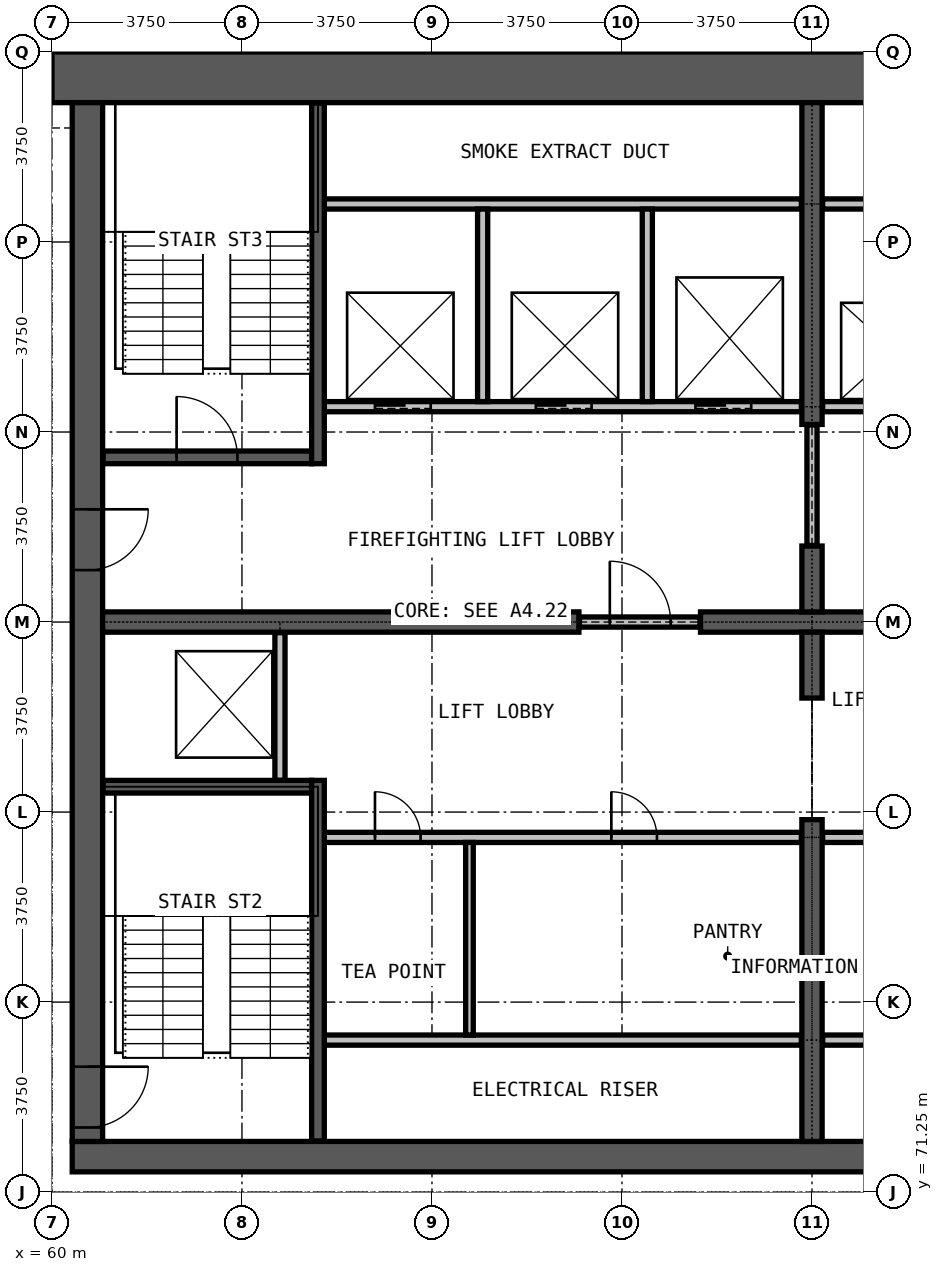
"""IFC4 building model, lengths in metres.
Left out: names, types, materials, properties, quantities, classifications, styles, units other than length and angle.
Written with IfcOpenShell. Run it as: python <this file> out.ifc"""

import sys

from ifc_helpers import new_model, si_unit, direction, frame, frame_2d, origin, place, context, subcontext, project, spatial, rectangle, extrude, element, fill, save


model = new_model("IFC4")
c1 = context("Model", 3, precision=1e-05, world=origin(), true_north=direction((0.0, 1.0)))
c2 = subcontext(c1, "Body", "Model", "MODEL_VIEW")
j1 = project(units=[si_unit("LENGTHUNIT", "METRE"), si_unit("PLANEANGLEUNIT", "RADIAN")], contexts=[c1])
p1 = place(None, origin())
s1 = spatial("IfcSite", under=j1, at=p1, CompositionType="ELEMENT")
p2 = place(p1, origin())
s2 = spatial("IfcBuilding", under=s1, at=p2, CompositionType="ELEMENT")
p3 = place(p2, frame((0.0, 0.0, 221.1)))
s3 = spatial("IfcBuildingStorey", under=s2, at=p3, CompositionType="ELEMENT", Elevation=221.1)
p4 = place(p3, frame((60.4, 71.95, 0.0), z_axis=(0.0, 0.0, 1.0), x_axis=(1.0, 0.0, 0.0)))
e1 = element("IfcWall", 1, at=p4, inside=s3, PredefinedType="SHEAR", context=c2, shape_type="SweptSolid", body=[
    extrude(rectangle(XDim=29.2, YDim=0.6, at=frame_2d((14.6, 0.0))), origin(), (0.0, 0.0, 1.0), 3.6),
])
p5 = place(p3, frame((90.0, 93.25, 0.0), z_axis=(0.0, 0.0, 1.0), x_axis=(-1.0, 0.0, 0.0)))
e2 = element("IfcWall", 2, at=p5, inside=s3, PredefinedType="SHEAR", context=c2, shape_type="SweptSolid", body=[
    extrude(rectangle(XDim=30.0, YDim=1.0, at=frame_2d((15.0, 0.0))), origin(), (0.0, 0.0, 1.0), 3.6),
])
p6 = place(p3, frame((60.7, 92.75, 0.0), z_axis=(0.0, 0.0, 1.0), x_axis=(0.0, -1.0, 0.0)))
e3 = element("IfcWall", 3, at=p6, inside=s3, PredefinedType="SHEAR", context=c2, shape_type="SweptSolid", body=[
    extrude(rectangle(XDim=20.5, YDim=0.6, at=frame_2d((10.25, 0.0))), origin(), (0.0, 0.0, 1.0), 3.6),
])
p7 = place(p6, frame((19.025, 0.0, 0.0)))
e4 = element("IfcOpeningElement", 4, at=p7, cuts=e3, PredefinedType="OPENING", context=c2, shape_type="SweptSolid", body=[
    extrude(rectangle(XDim=1.2, YDim=2.2, at=frame_2d((0.6, 1.1))), frame((0.0, 0.31, 0.0), z_axis=(0.0, -1.0, 0.0), x_axis=(1.0, 0.0, 0.0)), (0.0, 0.0, 1.0), 0.62),
])
p8 = place(p6, frame((8.025, 0.0, 0.0)))
e5 = element("IfcOpeningElement", 5, at=p8, cuts=e3, PredefinedType="OPENING", context=c2, shape_type="SweptSolid", body=[
    extrude(rectangle(XDim=1.2, YDim=2.2, at=frame_2d((0.6, 1.1))), frame((0.0, 0.31, 0.0), z_axis=(0.0, -1.0, 0.0), x_axis=(1.0, 0.0, 0.0)), (0.0, 0.0, 1.0), 0.62),
])
p9 = place(p3, frame((61.0, 82.5, 0.0), z_axis=(0.0, 0.0, 1.0), x_axis=(1.0, 0.0, 0.0)))
e6 = element("IfcWall", 6, at=p9, inside=s3, PredefinedType="SHEAR", context=c2, shape_type="SweptSolid", body=[
    extrude(rectangle(XDim=9.4, YDim=0.4, at=frame_2d((4.7, 0.0))), origin(), (0.0, 0.0, 1.0), 3.6),
])
p10 = place(p3, frame((72.8, 82.5, 0.0), z_axis=(0.0, 0.0, 1.0), x_axis=(1.0, 0.0, 0.0)))
e7 = element("IfcWall", 7, at=p10, inside=s3, PredefinedType="SHEAR", context=c2, shape_type="SweptSolid", body=[
    extrude(rectangle(XDim=4.4, YDim=0.4, at=frame_2d((2.2, 0.0))), origin(), (0.0, 0.0, 1.0), 3.6),
])
p11 = place(p3, frame((75.0, 72.25, 0.0), z_axis=(0.0, 0.0, 1.0), x_axis=(0.0, 1.0, 0.0)))
e8 = element("IfcWall", 8, at=p11, inside=s3, PredefinedType="SHEAR", context=c2, shape_type="SweptSolid", body=[
    extrude(rectangle(XDim=6.35, YDim=0.4, at=frame_2d((3.175, 0.0))), origin(), (0.0, 0.0, 1.0), 3.6),
])
for number, where, z_axis, x_axis in (
    (9, (75.0, 81.0, 0.0), (0.0, 0.0, 1.0), (0.0, 1.0, 0.0)),
    (10, (75.0, 82.7, 0.0), (0.0, 0.0, 1.0), (0.0, 1.0, 0.0)),
):
    element("IfcWall", number, at=place(p3, frame(where, z_axis=z_axis, x_axis=x_axis)), inside=s3, PredefinedType="SHEAR", context=c2, shape_type="SweptSolid", body=[
        extrude(rectangle(XDim=1.3, YDim=0.4, at=frame_2d((0.65, 0.0))), origin(), (0.0, 0.0, 1.0), 3.6),
    ])
p12 = place(p3, frame((75.0, 86.4, 0.0), z_axis=(0.0, 0.0, 1.0), x_axis=(0.0, 1.0, 0.0)))
e11 = element("IfcWall", 11, at=p12, inside=s3, PredefinedType="SHEAR", context=c2, shape_type="SweptSolid", body=[
    extrude(rectangle(XDim=6.35, YDim=0.4, at=frame_2d((3.175, 0.0))), origin(), (0.0, 0.0, 1.0), 3.6),
])
for number, where, z_axis, x_axis in (
    (12, (65.375, 74.25, 0.0), (0.0, 0.0, 1.0), (1.0, 0.0, 0.0)),
    (13, (75.21, 74.25, 0.0), (0.0, 0.0, 1.0), (1.0, 0.0, 0.0)),
):
    element("IfcWall", number, at=place(p3, frame(where, z_axis=z_axis, x_axis=x_axis)), inside=s3, PredefinedType="PARTITIONING", context=c2, shape_type="SweptSolid", body=[
        extrude(rectangle(XDim=9.415, YDim=0.2, at=frame_2d((4.708, 0.0))), origin(), (0.0, 0.0, 1.0), 3.3),
    ])
p13 = place(p3, frame((65.375, 78.25, 0.0), z_axis=(0.0, 0.0, 1.0), x_axis=(1.0, 0.0, 0.0)))
e14 = element("IfcWall", 14, at=p13, inside=s3, PredefinedType="PARTITIONING", context=c2, shape_type="SweptSolid", body=[
    extrude(rectangle(XDim=9.415, YDim=0.2, at=frame_2d((4.708, 0.0))), origin(), (0.0, 0.0, 1.0), 3.3),
])
p14 = place(p13, frame((1.0, 0.0, 0.0)))
e15 = element("IfcOpeningElement", 15, at=p14, cuts=e14, PredefinedType="OPENING", context=c2, shape_type="SweptSolid", body=[
    extrude(rectangle(XDim=0.9, YDim=2.2, at=frame_2d((0.45, 1.1))), frame((0.0, 0.11, 0.0), z_axis=(0.0, -1.0, 0.0), x_axis=(1.0, 0.0, 0.0)), (0.0, 0.0, 1.0), 0.22),
])
p15 = place(p13, frame((5.665, 0.0, 0.0)))
e16 = element("IfcOpeningElement", 16, at=p15, cuts=e14, PredefinedType="OPENING", context=c2, shape_type="SweptSolid", body=[
    extrude(rectangle(XDim=0.9, YDim=2.2, at=frame_2d((0.45, 1.1))), frame((0.0, 0.11, 0.0), z_axis=(0.0, -1.0, 0.0), x_axis=(1.0, 0.0, 0.0)), (0.0, 0.0, 1.0), 0.22),
])
p16 = place(p3, frame((75.21, 78.25, 0.0), z_axis=(0.0, 0.0, 1.0), x_axis=(1.0, 0.0, 0.0)))
e17 = element("IfcWall", 17, at=p16, inside=s3, PredefinedType="PARTITIONING", context=c2, shape_type="SweptSolid", body=[
    extrude(rectangle(XDim=9.415, YDim=0.2, at=frame_2d((4.708, 0.0))), origin(), (0.0, 0.0, 1.0), 3.3),
])
p17 = place(p16, frame((1.9, 0.0, 0.0)))
e18 = element("IfcOpeningElement", 18, at=p17, cuts=e17, PredefinedType="OPENING", context=c2, shape_type="SweptSolid", body=[
    extrude(rectangle(XDim=0.9, YDim=2.2, at=frame_2d((0.45, 1.1))), frame((0.0, 0.11, 0.0), z_axis=(0.0, -1.0, 0.0), x_axis=(1.0, 0.0, 0.0)), (0.0, 0.0, 1.0), 0.22),
])
p18 = place(p16, frame((6.565, 0.0, 0.0)))
e19 = element("IfcOpeningElement", 19, at=p18, cuts=e17, PredefinedType="OPENING", context=c2, shape_type="SweptSolid", body=[
    extrude(rectangle(XDim=0.9, YDim=2.2, at=frame_2d((0.45, 1.1))), frame((0.0, 0.11, 0.0), z_axis=(0.0, -1.0, 0.0), x_axis=(1.0, 0.0, 0.0)), (0.0, 0.0, 1.0), 0.22),
])
p19 = place(p3, frame((70.41, 82.5, 0.0), z_axis=(0.0, 0.0, 1.0), x_axis=(1.0, 0.0, 0.0)))
e20 = element("IfcWall", 20, at=p19, inside=s3, PredefinedType="PARTITIONING", context=c2, shape_type="SweptSolid", body=[
    extrude(rectangle(XDim=2.38, YDim=0.2, at=frame_2d((1.19, 0.0))), origin(), (0.0, 0.0, 1.0), 2.4),
])
p20 = place(p19, frame((0.6, 0.0, 0.0)))
e21 = element("IfcOpeningElement", 21, at=p20, cuts=e20, PredefinedType="OPENING", context=c2, shape_type="SweptSolid", body=[
    extrude(rectangle(XDim=1.2, YDim=2.2, at=frame_2d((0.6, 1.1))), frame((0.0, 0.11, 0.0), z_axis=(0.0, -1.0, 0.0), x_axis=(1.0, 0.0, 0.0)), (0.0, 0.0, 1.0), 0.22),
])
p21 = place(p3, frame((75.0, 84.01, 0.0), z_axis=(0.0, 0.0, 1.0), x_axis=(0.0, 1.0, 0.0)))
e22 = element("IfcWall", 22, at=p21, inside=s3, PredefinedType="PARTITIONING", context=c2, shape_type="SweptSolid", body=[
    extrude(rectangle(XDim=2.38, YDim=0.2, at=frame_2d((1.19, 0.0))), origin(), (0.0, 0.0, 1.0), 2.4),
])
p22 = place(p3, frame((68.24, 74.35, 0.0), z_axis=(0.0, 0.0, 1.0), x_axis=(0.0, 1.0, 0.0)))
e23 = element("IfcWall", 23, at=p22, inside=s3, PredefinedType="PARTITIONING", context=c2, shape_type="SweptSolid", body=[
    extrude(rectangle(XDim=3.8, YDim=0.15, at=frame_2d((1.9, 0.0))), origin(), (0.0, 0.0, 1.0), 3.3),
])
p23 = place(p3, frame((65.375, 86.75, 0.0), z_axis=(0.0, 0.0, 1.0), x_axis=(1.0, 0.0, 0.0)))
e24 = element("IfcWall", 24, at=p23, inside=s3, PredefinedType="PARTITIONING", context=c2, shape_type="SweptSolid", body=[
    extrude(rectangle(XDim=9.415, YDim=0.2, at=frame_2d((4.708, 0.0))), origin(), (0.0, 0.0, 1.0), 3.3),
])
p24 = place(p23, frame((1.0, 0.0, 0.0)))
e25 = element("IfcOpeningElement", 25, at=p24, cuts=e24, PredefinedType="OPENING", context=c2, shape_type="SweptSolid", body=[
    extrude(rectangle(XDim=1.1, YDim=2.2, at=frame_2d((0.55, 1.1))), frame((0.0, 0.11, 0.0), z_axis=(0.0, -1.0, 0.0), x_axis=(1.0, 0.0, 0.0)), (0.0, 0.0, 1.0), 0.22),
])
p25 = place(p23, frame((4.175, 0.0, 0.0)))
e26 = element("IfcOpeningElement", 26, at=p25, cuts=e24, PredefinedType="OPENING", context=c2, shape_type="SweptSolid", body=[
    extrude(rectangle(XDim=1.1, YDim=2.2, at=frame_2d((0.55, 1.1))), frame((0.0, 0.11, 0.0), z_axis=(0.0, -1.0, 0.0), x_axis=(1.0, 0.0, 0.0)), (0.0, 0.0, 1.0), 0.22),
])
p26 = place(p23, frame((7.325, 0.0, 0.0)))
e27 = element("IfcOpeningElement", 27, at=p26, cuts=e24, PredefinedType="OPENING", context=c2, shape_type="SweptSolid", body=[
    extrude(rectangle(XDim=1.1, YDim=2.2, at=frame_2d((0.55, 1.1))), frame((0.0, 0.11, 0.0), z_axis=(0.0, -1.0, 0.0), x_axis=(1.0, 0.0, 0.0)), (0.0, 0.0, 1.0), 0.22),
])
p27 = place(p3, frame((75.21, 86.75, 0.0), z_axis=(0.0, 0.0, 1.0), x_axis=(1.0, 0.0, 0.0)))
e28 = element("IfcWall", 28, at=p27, inside=s3, PredefinedType="PARTITIONING", context=c2, shape_type="SweptSolid", body=[
    extrude(rectangle(XDim=9.415, YDim=0.2, at=frame_2d((4.708, 0.0))), origin(), (0.0, 0.0, 1.0), 3.3),
])
p28 = place(p27, frame((0.95, 0.0, 0.0)))
e29 = element("IfcOpeningElement", 29, at=p28, cuts=e28, PredefinedType="OPENING", context=c2, shape_type="SweptSolid", body=[
    extrude(rectangle(XDim=1.1, YDim=2.2, at=frame_2d((0.55, 1.1))), frame((0.0, 0.11, 0.0), z_axis=(0.0, -1.0, 0.0), x_axis=(1.0, 0.0, 0.0)), (0.0, 0.0, 1.0), 0.22),
])
p29 = place(p27, frame((4.14, 0.0, 0.0)))
e30 = element("IfcOpeningElement", 30, at=p29, cuts=e28, PredefinedType="OPENING", context=c2, shape_type="SweptSolid", body=[
    extrude(rectangle(XDim=1.1, YDim=2.2, at=frame_2d((0.55, 1.1))), frame((0.0, 0.11, 0.0), z_axis=(0.0, -1.0, 0.0), x_axis=(1.0, 0.0, 0.0)), (0.0, 0.0, 1.0), 0.22),
])
p30 = place(p27, frame((7.29, 0.0, 0.0)))
e31 = element("IfcOpeningElement", 31, at=p30, cuts=e28, PredefinedType="OPENING", context=c2, shape_type="SweptSolid", body=[
    extrude(rectangle(XDim=1.1, YDim=2.2, at=frame_2d((0.55, 1.1))), frame((0.0, 0.11, 0.0), z_axis=(0.0, -1.0, 0.0), x_axis=(1.0, 0.0, 0.0)), (0.0, 0.0, 1.0), 0.22),
])
for number, where, z_axis, x_axis in (
    (32, (65.375, 90.75, 0.0), (0.0, 0.0, 1.0), (1.0, 0.0, 0.0)),
    (33, (75.21, 90.75, 0.0), (0.0, 0.0, 1.0), (1.0, 0.0, 0.0)),
):
    element("IfcWall", number, at=place(p3, frame(where, z_axis=z_axis, x_axis=x_axis)), inside=s3, PredefinedType="PARTITIONING", context=c2, shape_type="SweptSolid", body=[
        extrude(rectangle(XDim=9.415, YDim=0.2, at=frame_2d((4.708, 0.0))), origin(), (0.0, 0.0, 1.0), 3.3),
    ])
p31 = place(p3, frame((64.5, 79.375, 0.0), z_axis=(0.0, 0.0, 1.0), x_axis=(0.0, 1.0, 0.0)))
e34 = element("IfcWall", 34, at=p31, inside=s3, PredefinedType="PARTITIONING", context=c2, shape_type="SweptSolid", body=[
    extrude(rectangle(XDim=2.915, YDim=0.2, at=frame_2d((1.458, 0.0))), origin(), (0.0, 0.0, 1.0), 3.3),
])
for number, where, z_axis, x_axis in (
    (35, (68.5, 86.85, 0.0), (0.0, 0.0, 1.0), (0.0, 1.0, 0.0)),
    (36, (71.75, 86.85, 0.0), (0.0, 0.0, 1.0), (0.0, 1.0, 0.0)),
):
    element("IfcWall", number, at=place(p3, frame(where, z_axis=z_axis, x_axis=x_axis)), inside=s3, PredefinedType="PARTITIONING", context=c2, shape_type="SweptSolid", body=[
        extrude(rectangle(XDim=3.8, YDim=0.2, at=frame_2d((1.9, 0.0))), origin(), (0.0, 0.0, 1.0), 3.3),
    ])
p32 = place(p3, frame((61.01, 79.25, 0.0), z_axis=(0.0, 0.0, 1.0), x_axis=(1.0, 0.0, 0.0)))
e37 = element("IfcWall", 37, at=p32, inside=s3, PredefinedType="PARTITIONING", context=c2, shape_type="SweptSolid", body=[
    extrude(rectangle(XDim=4.115, YDim=0.25, at=frame_2d((2.058, 0.0))), origin(), (0.0, 0.0, 1.0), 3.3),
])
p33 = place(p3, frame((61.01, 85.75, 0.0), z_axis=(0.0, 0.0, 1.0), x_axis=(1.0, 0.0, 0.0)))
e38 = element("IfcWall", 38, at=p33, inside=s3, PredefinedType="PARTITIONING", context=c2, shape_type="SweptSolid", body=[
    extrude(rectangle(XDim=4.115, YDim=0.25, at=frame_2d((2.058, 0.0))), origin(), (0.0, 0.0, 1.0), 3.3),
])
p34 = place(p33, frame((1.45, 0.0, 0.0)))
e39 = element("IfcOpeningElement", 39, at=p34, cuts=e38, PredefinedType="OPENING", context=c2, shape_type="SweptSolid", body=[
    extrude(rectangle(XDim=1.2, YDim=2.2, at=frame_2d((0.6, 1.1))), frame((0.0, 0.135, 0.0), z_axis=(0.0, -1.0, 0.0), x_axis=(1.0, 0.0, 0.0)), (0.0, 0.0, 1.0), 0.27),
])
for number, where, z_axis, x_axis in (
    (40, (65.25, 72.26, 0.0), (0.0, 0.0, 1.0), (0.0, 1.0, 0.0)),
    (41, (65.25, 85.625, 0.0), (0.0, 0.0, 1.0), (0.0, 1.0, 0.0)),
):
    element("IfcWall", number, at=place(p3, frame(where, z_axis=z_axis, x_axis=x_axis)), inside=s3, PredefinedType="PARTITIONING", context=c2, shape_type="SweptSolid", body=[
        extrude(rectangle(XDim=7.115, YDim=0.25, at=frame_2d((3.558, 0.0))), origin(), (0.0, 0.0, 1.0), 3.3),
    ])
p35 = place(p24, origin())
e42 = element("IfcDoor", 42, at=p35, inside=s3, OperationType="DOUBLE_DOOR_SLIDING", PredefinedType="DOOR", context=c2, shape_type="SweptSolid", body=[
    extrude(rectangle(XDim=1.1, YDim=2.2, at=frame_2d((0.55, 1.1))), frame((0.0, 0.025, 0.0), z_axis=(0.0, -1.0, 0.0), x_axis=(1.0, 0.0, 0.0)), (0.0, 0.0, 1.0), 0.05),
])
fill(e25, e42)
p36 = place(p25, origin())
e43 = element("IfcDoor", 43, at=p36, inside=s3, OperationType="DOUBLE_DOOR_SLIDING", PredefinedType="DOOR", context=c2, shape_type="SweptSolid", body=[
    extrude(rectangle(XDim=1.1, YDim=2.2, at=frame_2d((0.55, 1.1))), frame((0.0, 0.025, 0.0), z_axis=(0.0, -1.0, 0.0), x_axis=(1.0, 0.0, 0.0)), (0.0, 0.0, 1.0), 0.05),
])
fill(e26, e43)
p37 = place(p26, origin())
e44 = element("IfcDoor", 44, at=p37, inside=s3, OperationType="DOUBLE_DOOR_SLIDING", PredefinedType="DOOR", context=c2, shape_type="SweptSolid", body=[
    extrude(rectangle(XDim=1.1, YDim=2.2, at=frame_2d((0.55, 1.1))), frame((0.0, 0.025, 0.0), z_axis=(0.0, -1.0, 0.0), x_axis=(1.0, 0.0, 0.0)), (0.0, 0.0, 1.0), 0.05),
])
fill(e27, e44)
p38 = place(p20, origin())
e45 = element("IfcDoor", 45, at=p38, inside=s3, OperationType="SINGLE_SWING_LEFT", PredefinedType="DOOR", context=c2, shape_type="SweptSolid", body=[
    extrude(rectangle(XDim=1.2, YDim=2.2, at=frame_2d((0.6, 1.1))), frame((0.0, 0.025, 0.0), z_axis=(0.0, -1.0, 0.0), x_axis=(1.0, 0.0, 0.0)), (0.0, 0.0, 1.0), 0.05),
])
fill(e21, e45)
p39 = place(p34, origin())
e46 = element("IfcDoor", 46, at=p39, inside=s3, OperationType="SINGLE_SWING_LEFT", PredefinedType="DOOR", context=c2, shape_type="SweptSolid", body=[
    extrude(rectangle(XDim=1.2, YDim=2.2, at=frame_2d((0.6, 1.1))), frame((0.0, 0.025, 0.0), z_axis=(0.0, -1.0, 0.0), x_axis=(1.0, 0.0, 0.0)), (0.0, 0.0, 1.0), 0.05),
])
fill(e39, e46)
p40 = place(p7, origin())
e47 = element("IfcDoor", 47, at=p40, inside=s3, OperationType="SINGLE_SWING_LEFT", PredefinedType="DOOR", context=c2, shape_type="SweptSolid", body=[
    extrude(rectangle(XDim=1.2, YDim=2.2, at=frame_2d((0.6, 1.1))), frame((0.0, 0.025, 0.0), z_axis=(0.0, -1.0, 0.0), x_axis=(1.0, 0.0, 0.0)), (0.0, 0.0, 1.0), 0.05),
])
fill(e4, e47)
p41 = place(p8, origin())
e48 = element("IfcDoor", 48, at=p41, inside=s3, OperationType="SINGLE_SWING_LEFT", PredefinedType="DOOR", context=c2, shape_type="SweptSolid", body=[
    extrude(rectangle(XDim=1.2, YDim=2.2, at=frame_2d((0.6, 1.1))), frame((0.0, 0.025, 0.0), z_axis=(0.0, -1.0, 0.0), x_axis=(1.0, 0.0, 0.0)), (0.0, 0.0, 1.0), 0.05),
])
fill(e5, e48)
p42 = place(p14, origin())
e49 = element("IfcDoor", 49, at=p42, inside=s3, OperationType="SINGLE_SWING_LEFT", PredefinedType="DOOR", context=c2, shape_type="SweptSolid", body=[
    extrude(rectangle(XDim=0.9, YDim=2.2, at=frame_2d((0.45, 1.1))), frame((0.0, 0.025, 0.0), z_axis=(0.0, -1.0, 0.0), x_axis=(1.0, 0.0, 0.0)), (0.0, 0.0, 1.0), 0.05),
])
fill(e15, e49)
p43 = place(p15, origin())
e50 = element("IfcDoor", 50, at=p43, inside=s3, OperationType="SINGLE_SWING_LEFT", PredefinedType="DOOR", context=c2, shape_type="SweptSolid", body=[
    extrude(rectangle(XDim=0.9, YDim=2.2, at=frame_2d((0.45, 1.1))), frame((0.0, 0.025, 0.0), z_axis=(0.0, -1.0, 0.0), x_axis=(1.0, 0.0, 0.0)), (0.0, 0.0, 1.0), 0.05),
])
fill(e16, e50)
save(model, sys.argv[1])
